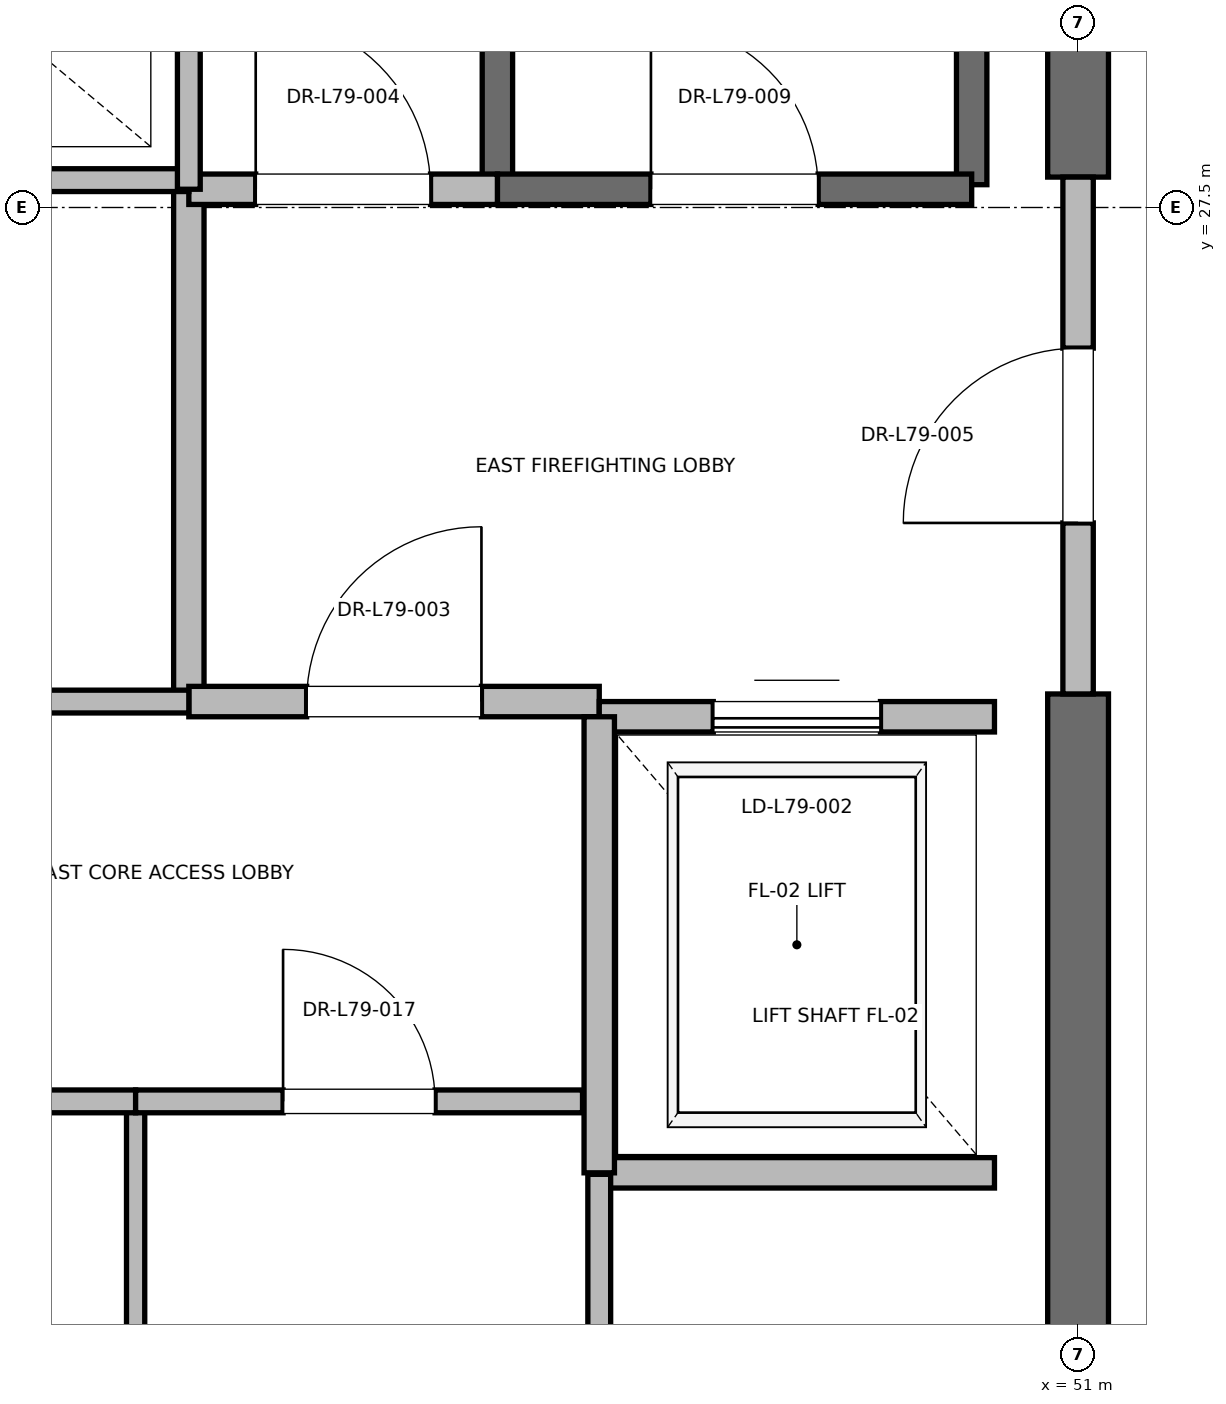
"""IFC4 building model, lengths in metres.
Left out: names, types, materials, properties, quantities, classifications, styles, units other than length and angle.
Written with IfcOpenShell. Run it as: python <this file> out.ifc"""

import sys

from ifc_helpers import new_model, si_unit, direction, frame, frame_2d, origin, place, context, subcontext, project, spatial, rectangle, extrude, element, fill, save


model = new_model("IFC4")
c1 = context("Model", 3, precision=1e-05, world=origin(), true_north=direction((0.0, 1.0)))
c2 = subcontext(c1, "Body", "Model", "MODEL_VIEW")
j1 = project(units=[si_unit("LENGTHUNIT", "METRE"), si_unit("PLANEANGLEUNIT", "RADIAN")], contexts=[c1])
p1 = place(None, origin())
s1 = spatial("IfcSite", under=j1, at=p1, CompositionType="ELEMENT")
p2 = place(p1, origin())
s2 = spatial("IfcBuilding", under=s1, at=p2, CompositionType="ELEMENT")
p3 = place(p2, frame((0.0, 0.0, 338.8)))
s3 = spatial("IfcBuildingStorey", under=s2, at=p3, CompositionType="ELEMENT", Elevation=338.8)
p4 = place(p3, frame((51.0, 18.5, 0.0), z_axis=(0.0, 0.0, 1.0), x_axis=(0.0, 1.0, 0.0)))
e1 = element("IfcWall", 1, at=p4, inside=s3, PredefinedType="SHEAR", context=c2, shape_type="SweptSolid", body=[
    extrude(rectangle(XDim=5.8, YDim=0.4, at=frame_2d((2.9, 0.0))), origin(), (0.0, 0.0, 1.0), 3.7),
])
p5 = place(p3, frame((51.0, 27.7, 0.0), z_axis=(0.0, 0.0, 1.0), x_axis=(0.0, 1.0, 0.0)))
e2 = element("IfcWall", 2, at=p5, inside=s3, PredefinedType="SHEAR", context=c2, shape_type="SweptSolid", body=[
    extrude(rectangle(XDim=8.8, YDim=0.4, at=frame_2d((4.4, 0.0))), origin(), (0.0, 0.0, 1.0), 3.7),
])
p6 = place(p3, frame((50.3, 27.65, 0.0), z_axis=(0.0, 0.0, 1.0), x_axis=(0.0, 1.0, 0.0)))
e3 = element("IfcWall", 3, at=p6, inside=s3, PredefinedType="SOLIDWALL", context=c2, shape_type="SweptSolid", body=[
    extrude(rectangle(XDim=8.15, YDim=0.2, at=frame_2d((4.075, 0.0))), origin(), (0.0, 0.0, 1.0), 3.7),
])
p7 = place(p3, frame((47.18, 27.62, 0.0), z_axis=(0.0, 0.0, 1.0), x_axis=(0.0, 1.0, 0.0)))
e4 = element("IfcWall", 4, at=p7, inside=s3, PredefinedType="SOLIDWALL", context=c2, shape_type="SweptSolid", body=[
    extrude(rectangle(XDim=8.18, YDim=0.2, at=frame_2d((4.09, 0.0))), origin(), (0.0, 0.0, 1.0), 3.7),
])
p8 = place(p3, frame((47.18, 27.62, 0.0), z_axis=(0.0, 0.0, 1.0), x_axis=(1.0, 0.0, 0.0)))
e5 = element("IfcWall", 5, at=p8, inside=s3, PredefinedType="SOLIDWALL", context=c2, shape_type="SweptSolid", body=[
    extrude(rectangle(XDim=3.12, YDim=0.2, at=frame_2d((1.56, 0.0))), origin(), (0.0, 0.0, 1.0), 3.7),
])
p9 = place(p8, frame((1.01, 0.0, 0.0)))
e6 = element("IfcOpeningElement", 6, at=p9, cuts=e5, PredefinedType="OPENING", context=c2, shape_type="SweptSolid", body=[
    extrude(rectangle(XDim=1.1, YDim=2.15, at=frame_2d((0.55, 1.075))), frame((0.0, 0.1, 0.0), z_axis=(0.0, -1.0, 0.0), x_axis=(1.0, 0.0, 0.0)), (0.0, 0.0, 1.0), 0.2),
])
p10 = place(p3, frame((45.15, 24.25, 0.0), z_axis=(0.0, 0.0, 1.0), x_axis=(0.0, 1.0, 0.0)))
e7 = element("IfcWall", 7, at=p10, inside=s3, PredefinedType="PARTITIONING", context=c2, shape_type="SweptSolid", body=[
    extrude(rectangle(XDim=3.37, YDim=0.2, at=frame_2d((1.685, 0.0))), origin(), (0.0, 0.0, 1.0), 3.7),
])
p11 = place(p3, frame((45.15, 24.25, 0.0), z_axis=(0.0, 0.0, 1.0), x_axis=(1.0, 0.0, 0.0)))
e8 = element("IfcWall", 8, at=p11, inside=s3, PredefinedType="PARTITIONING", context=c2, shape_type="SweptSolid", body=[
    extrude(rectangle(XDim=2.7, YDim=0.2, at=frame_2d((1.35, 0.0))), origin(), (0.0, 0.0, 1.0), 3.7),
])
p12 = place(p11, frame((0.775, 0.0, 0.0)))
e9 = element("IfcOpeningElement", 9, at=p12, cuts=e8, PredefinedType="OPENING", context=c2, shape_type="SweptSolid", body=[
    extrude(rectangle(XDim=1.15, YDim=2.2, at=frame_2d((0.575, 1.1))), frame((0.0, 0.1, 0.0), z_axis=(0.0, -1.0, 0.0), x_axis=(1.0, 0.0, 0.0)), (0.0, 0.0, 1.0), 0.2),
])
p13 = place(p3, frame((45.15, 27.62, 0.0), z_axis=(0.0, 0.0, 1.0), x_axis=(1.0, 0.0, 0.0)))
e10 = element("IfcWall", 10, at=p13, inside=s3, PredefinedType="PARTITIONING", context=c2, shape_type="SweptSolid", body=[
    extrude(rectangle(XDim=2.03, YDim=0.2, at=frame_2d((1.015, 0.0))), origin(), (0.0, 0.0, 1.0), 3.7),
])
p14 = place(p13, frame((0.44, 0.0, 0.0)))
e11 = element("IfcOpeningElement", 11, at=p14, cuts=e10, PredefinedType="OPENING", context=c2, shape_type="SweptSolid", body=[
    extrude(rectangle(XDim=1.15, YDim=2.2, at=frame_2d((0.575, 1.1))), frame((0.0, 0.1, 0.0), z_axis=(0.0, -1.0, 0.0), x_axis=(1.0, 0.0, 0.0)), (0.0, 0.0, 1.0), 0.2),
])
p15 = place(p3, frame((51.0, 24.3, 0.0), z_axis=(0.0, 0.0, 1.0), x_axis=(0.0, 1.0, 0.0)))
e12 = element("IfcWall", 12, at=p15, inside=s3, PredefinedType="PARTITIONING", context=c2, shape_type="SweptSolid", body=[
    extrude(rectangle(XDim=3.4, YDim=0.2, at=frame_2d((1.7, 0.0))), origin(), (0.0, 0.0, 1.0), 2.78),
])
p16 = place(p15, frame((1.125, 0.0, 0.0)))
e13 = element("IfcOpeningElement", 13, at=p16, cuts=e12, PredefinedType="OPENING", context=c2, shape_type="SweptSolid", body=[
    extrude(rectangle(XDim=1.15, YDim=2.2, at=frame_2d((0.575, 1.1))), frame((0.0, 0.1, 0.0), z_axis=(0.0, -1.0, 0.0), x_axis=(1.0, 0.0, 0.0)), (0.0, 0.0, 1.0), 0.2),
])
p17 = place(p3, frame((47.85, 21.15, 0.0), z_axis=(0.0, 0.0, 1.0), x_axis=(1.0, 0.0, 0.0)))
e14 = element("IfcWall", 14, at=p17, inside=s3, PredefinedType="SOLIDWALL", context=c2, shape_type="SweptSolid", body=[
    extrude(rectangle(XDim=2.6, YDim=0.2, at=frame_2d((1.3, 0.0))), origin(), (0.0, 0.0, 1.0), 3.7),
])
p18 = place(p3, frame((50.45, 24.15, 0.0), z_axis=(0.0, 0.0, 1.0), x_axis=(-1.0, 0.0, 0.0)))
e15 = element("IfcWall", 15, at=p18, inside=s3, PredefinedType="SOLIDWALL", context=c2, shape_type="SweptSolid", body=[
    extrude(rectangle(XDim=2.6, YDim=0.2, at=frame_2d((1.3, 0.0))), origin(), (0.0, 0.0, 1.0), 2.78),
])
p19 = place(p18, frame((0.75, 0.0, 0.0)))
e16 = element("IfcOpeningElement", 16, at=p19, cuts=e15, PredefinedType="OPENING", context=c2, shape_type="SweptSolid", body=[
    extrude(rectangle(XDim=1.1, YDim=2.2, at=frame_2d((0.55, 1.1))), frame((0.0, 0.1, 0.0), z_axis=(0.0, -1.0, 0.0), x_axis=(1.0, 0.0, 0.0)), (0.0, 0.0, 1.0), 0.2),
])
p20 = place(p3, frame((47.85, 24.15, 0.0), z_axis=(0.0, 0.0, 1.0), x_axis=(0.0, -1.0, 0.0)))
e17 = element("IfcWall", 17, at=p20, inside=s3, PredefinedType="SOLIDWALL", context=c2, shape_type="SweptSolid", body=[
    extrude(rectangle(XDim=3.0, YDim=0.2, at=frame_2d((1.5, 0.0))), origin(), (0.0, 0.0, 1.0), 3.7),
])
p21 = place(p3, frame((41.56, 27.68, 0.0), z_axis=(0.0, 0.0, 1.0), x_axis=(1.0, 0.0, 0.0)))
e18 = element("IfcWall", 18, at=p21, inside=s3, PredefinedType="PARTITIONING", context=c2, shape_type="SweptSolid", body=[
    extrude(rectangle(XDim=3.59, YDim=0.15, at=frame_2d((1.795, 0.0))), origin(), (0.0, 0.0, 1.0), 2.85),
])
p22 = place(p3, frame((47.85, 18.6, 0.0), z_axis=(0.0, 0.0, 1.0), x_axis=(0.0, 1.0, 0.0)))
e19 = element("IfcWall", 19, at=p22, inside=s3, PredefinedType="PARTITIONING", context=c2, shape_type="SweptSolid", body=[
    extrude(rectangle(XDim=2.54, YDim=0.15, at=frame_2d((1.27, 0.0))), origin(), (0.0, 0.0, 1.0), 2.85),
])
p23 = place(p3, frame((44.8, 18.6, 0.0), z_axis=(0.0, 0.0, 1.0), x_axis=(0.0, 1.0, 0.0)))
e20 = element("IfcWall", 20, at=p23, inside=s3, PredefinedType="PARTITIONING", context=c2, shape_type="SweptSolid", body=[
    extrude(rectangle(XDim=3.02, YDim=0.12, at=frame_2d((1.51, 0.0))), origin(), (0.0, 0.0, 1.0), 2.85),
])
p24 = place(p3, frame((41.76, 21.62, 0.0), z_axis=(0.0, 0.0, 1.0), x_axis=(1.0, 0.0, 0.0)))
e21 = element("IfcWall", 21, at=p24, inside=s3, PredefinedType="PARTITIONING", context=c2, shape_type="SweptSolid", body=[
    extrude(rectangle(XDim=3.04, YDim=0.15, at=frame_2d((1.52, 0.0))), origin(), (0.0, 0.0, 1.0), 2.85),
])
p25 = place(p24, frame((1.02, 0.0, 0.0)))
e22 = element("IfcOpeningElement", 22, at=p25, cuts=e21, PredefinedType="OPENING", context=c2, shape_type="SweptSolid", body=[
    extrude(rectangle(XDim=1.0, YDim=2.15, at=frame_2d((0.5, 1.075))), frame((0.0, 0.075, 0.0), z_axis=(0.0, -1.0, 0.0), x_axis=(1.0, 0.0, 0.0)), (0.0, 0.0, 1.0), 0.15),
])
p26 = place(p3, frame((44.8, 21.62, 0.0), z_axis=(0.0, 0.0, 1.0), x_axis=(1.0, 0.0, 0.0)))
e23 = element("IfcWall", 23, at=p26, inside=s3, PredefinedType="PARTITIONING", context=c2, shape_type="SweptSolid", body=[
    extrude(rectangle(XDim=2.94, YDim=0.15, at=frame_2d((1.47, 0.0))), origin(), (0.0, 0.0, 1.0), 2.85),
])
p27 = place(p26, frame((0.97, 0.0, 0.0)))
e24 = element("IfcOpeningElement", 24, at=p27, cuts=e23, PredefinedType="OPENING", context=c2, shape_type="SweptSolid", body=[
    extrude(rectangle(XDim=1.0, YDim=2.15, at=frame_2d((0.5, 1.075))), frame((0.0, 0.075, 0.0), z_axis=(0.0, -1.0, 0.0), x_axis=(1.0, 0.0, 0.0)), (0.0, 0.0, 1.0), 0.15),
])
p28 = place(p3, frame((41.76, 24.25, 0.0), z_axis=(0.0, 0.0, 1.0), x_axis=(1.0, 0.0, 0.0)))
e25 = element("IfcWall", 25, at=p28, inside=s3, PredefinedType="PARTITIONING", context=c2, shape_type="SweptSolid", body=[
    extrude(rectangle(XDim=3.39, YDim=0.15, at=frame_2d((1.695, 0.0))), origin(), (0.0, 0.0, 1.0), 2.85),
])
p29 = place(p28, frame((1.255, 0.0, 0.0)))
e26 = element("IfcOpeningElement", 26, at=p29, cuts=e25, PredefinedType="OPENING", context=c2, shape_type="SweptSolid", body=[
    extrude(rectangle(XDim=0.88, YDim=2.1, at=frame_2d((0.44, 1.05))), frame((0.0, 0.075, 0.0), z_axis=(0.0, -1.0, 0.0), x_axis=(1.0, 0.0, 0.0)), (0.0, 0.0, 1.0), 0.15),
])
p30 = place(p3, frame((45.15, 27.62, 0.0), z_axis=(0.0, 0.0, 1.0), x_axis=(0.0, 1.0, 0.0)))
e27 = element("IfcWall", 27, at=p30, inside=s3, PredefinedType="PARTITIONING", context=c2, shape_type="SweptSolid", body=[
    extrude(rectangle(XDim=3.1, YDim=0.15, at=frame_2d((1.55, 0.0))), origin(), (0.0, 0.0, 1.0), 2.85),
])
p31 = place(p9, origin())
e28 = element("IfcDoor", 28, at=p31, inside=s3, OperationType="SINGLE_SWING_LEFT", PredefinedType="DOOR", context=c2, shape_type="SweptSolid", body=[
    extrude(rectangle(XDim=1.1, YDim=2.15, at=frame_2d((0.55, 1.075))), frame((0.0, 0.025, 0.0), z_axis=(0.0, -1.0, 0.0), x_axis=(1.0, 0.0, 0.0)), (0.0, 0.0, 1.0), 0.05),
])
fill(e6, e28)
p32 = place(p12, origin())
e29 = element("IfcDoor", 29, at=p32, inside=s3, OperationType="SINGLE_SWING_RIGHT", PredefinedType="DOOR", context=c2, shape_type="SweptSolid", body=[
    extrude(rectangle(XDim=1.15, YDim=2.2, at=frame_2d((0.575, 1.1))), frame((0.0, 0.025, 0.0), z_axis=(0.0, -1.0, 0.0), x_axis=(1.0, 0.0, 0.0)), (0.0, 0.0, 1.0), 0.05),
])
fill(e9, e29)
p33 = place(p14, origin())
e30 = element("IfcDoor", 30, at=p33, inside=s3, OperationType="SINGLE_SWING_LEFT", PredefinedType="DOOR", context=c2, shape_type="SweptSolid", body=[
    extrude(rectangle(XDim=1.15, YDim=2.2, at=frame_2d((0.575, 1.1))), frame((0.0, 0.025, 0.0), z_axis=(0.0, -1.0, 0.0), x_axis=(1.0, 0.0, 0.0)), (0.0, 0.0, 1.0), 0.05),
])
fill(e11, e30)
p34 = place(p16, origin())
e31 = element("IfcDoor", 31, at=p34, inside=s3, OperationType="SINGLE_SWING_LEFT", PredefinedType="DOOR", context=c2, shape_type="SweptSolid", body=[
    extrude(rectangle(XDim=1.15, YDim=2.2, at=frame_2d((0.575, 1.1))), frame((0.0, 0.025, 0.0), z_axis=(0.0, -1.0, 0.0), x_axis=(1.0, 0.0, 0.0)), (0.0, 0.0, 1.0), 0.05),
])
fill(e13, e31)
p35 = place(p19, origin())
e32 = element("IfcDoor", 32, at=p35, inside=s3, OperationType="SLIDING_TO_RIGHT", PredefinedType="DOOR", context=c2, shape_type="SweptSolid", body=[
    extrude(rectangle(XDim=1.1, YDim=2.2, at=frame_2d((0.55, 1.1))), frame((0.0, 0.025, 0.0), z_axis=(0.0, -1.0, 0.0), x_axis=(1.0, 0.0, 0.0)), (0.0, 0.0, 1.0), 0.05),
])
fill(e16, e32)
p36 = place(p27, origin())
e33 = element("IfcDoor", 33, at=p36, inside=s3, OperationType="SINGLE_SWING_LEFT", PredefinedType="DOOR", context=c2, shape_type="SweptSolid", body=[
    extrude(rectangle(XDim=1.0, YDim=2.15, at=frame_2d((0.5, 1.075))), frame((0.0, 0.025, 0.0), z_axis=(0.0, -1.0, 0.0), x_axis=(1.0, 0.0, 0.0)), (0.0, 0.0, 1.0), 0.05),
])
fill(e24, e33)
save(model, sys.argv[1])
